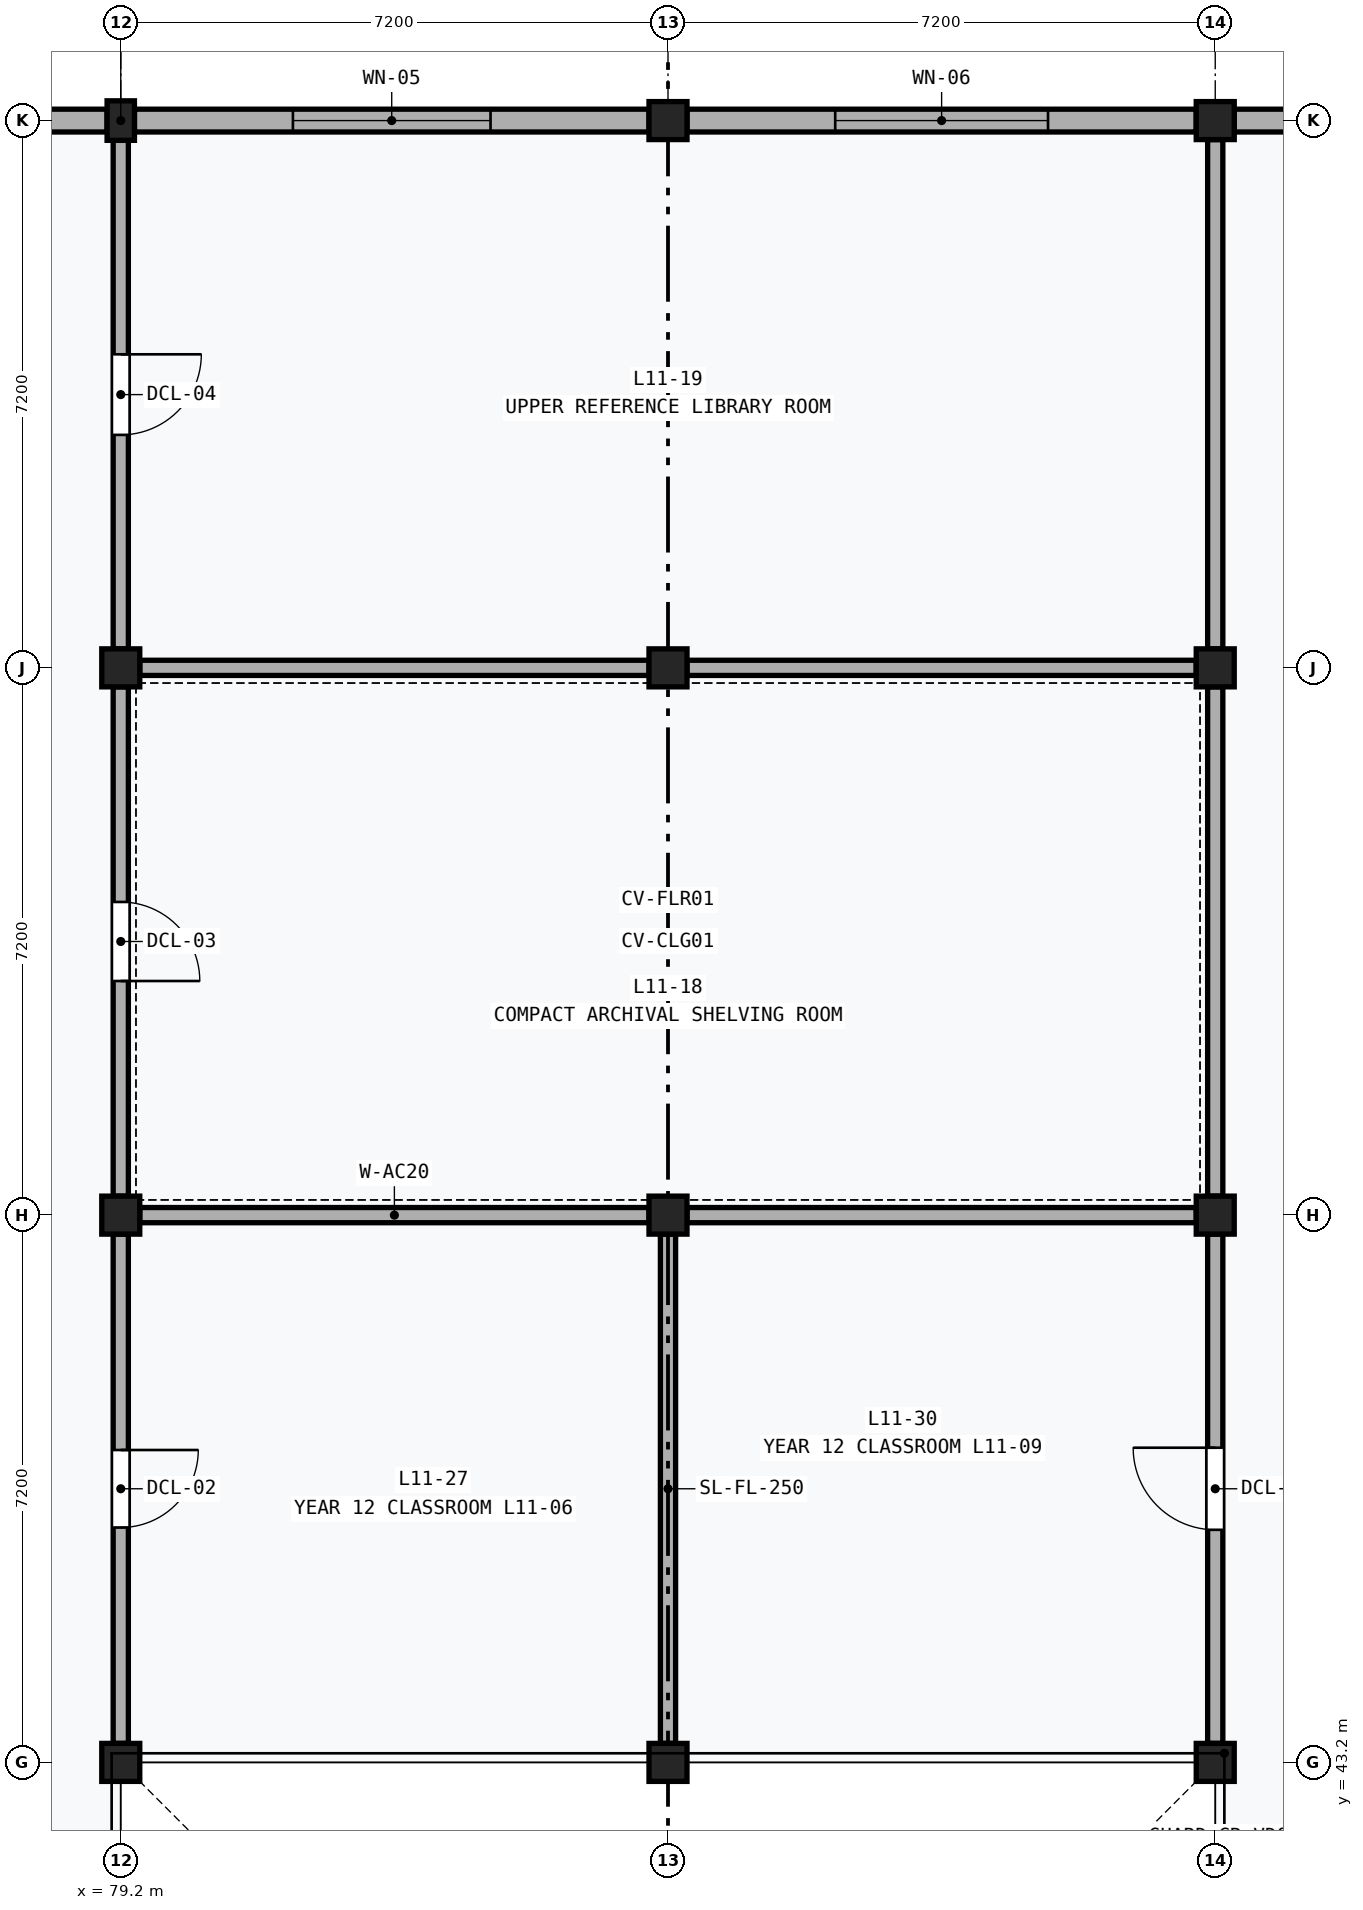
"""IFC4 building model, lengths in metres.
Left out: names, types, materials, properties, quantities, classifications, styles, units other than length and angle.
Written with IfcOpenShell. Run it as: python <this file> out.ifc"""

import sys

from ifc_helpers import new_model, si_unit, direction, frame, frame_2d, origin, origin_2d, place, context, subcontext, project, spatial, rectangle, extrude, element, fill, save


model = new_model("IFC4")
c1 = context("Model", 3, precision=1e-05, world=origin(), true_north=direction((0.0, 1.0)))
c2 = subcontext(c1, "Body", "Model", "MODEL_VIEW")
j1 = project(units=[si_unit("LENGTHUNIT", "METRE"), si_unit("PLANEANGLEUNIT", "RADIAN")], contexts=[c1])
p1 = place(None, origin())
s1 = spatial("IfcSite", under=j1, at=p1, CompositionType="ELEMENT")
p2 = place(p1, origin())
s2 = spatial("IfcBuilding", under=s1, at=p2, CompositionType="ELEMENT")
p3 = place(p2, frame((0.0, 0.0, 46.8)))
s3 = spatial("IfcBuildingStorey", under=s2, at=p3, CompositionType="ELEMENT", Elevation=46.8)
for number, where, z_axis, x_axis in (
    (1, (79.2, 43.2, 0.0), (0.0, 0.0, 1.0), (1.0, 0.0, 0.0)),
    (2, (79.2, 50.4, 0.0), (0.0, 0.0, 1.0), (1.0, 0.0, 0.0)),
    (3, (79.2, 57.6, 0.0), (0.0, 0.0, 1.0), (1.0, 0.0, 0.0)),
):
    element("IfcColumn", number, at=place(p3, frame(where, z_axis=z_axis, x_axis=x_axis)), inside=s3, PredefinedType="COLUMN", context=c2, shape_type="SweptSolid", body=[
        extrude(rectangle(XDim=0.5, YDim=0.5, at=origin_2d()), origin(), (0.0, 0.0, 1.0), 4.2),
    ])
p4 = place(p3, frame((79.2, 64.8, 0.0), z_axis=(0.0, 0.0, 1.0), x_axis=(1.0, 0.0, 0.0)))
e4 = element("IfcColumn", 4, at=p4, inside=s3, PredefinedType="PILASTER", context=c2, shape_type="SweptSolid", body=[
    extrude(rectangle(XDim=0.36, YDim=0.52, at=origin_2d()), origin(), (0.0, 0.0, 1.0), 4.2),
])
for number, where, z_axis, x_axis in (
    (5, (86.4, 43.2, 0.0), (0.0, 0.0, 1.0), (1.0, 0.0, 0.0)),
    (6, (86.4, 50.4, 0.0), (0.0, 0.0, 1.0), (1.0, 0.0, 0.0)),
    (7, (86.4, 57.6, 0.0), (0.0, 0.0, 1.0), (1.0, 0.0, 0.0)),
    (8, (86.4, 64.8, 0.0), (0.0, 0.0, 1.0), (1.0, 0.0, 0.0)),
    (9, (93.6, 43.2, 0.0), (0.0, 0.0, 1.0), (1.0, 0.0, 0.0)),
    (10, (93.6, 50.4, 0.0), (0.0, 0.0, 1.0), (1.0, 0.0, 0.0)),
    (11, (93.6, 57.6, 0.0), (0.0, 0.0, 1.0), (1.0, 0.0, 0.0)),
    (12, (93.6, 64.8, 0.0), (0.0, 0.0, 1.0), (1.0, 0.0, 0.0)),
):
    element("IfcColumn", number, at=place(p3, frame(where, z_axis=z_axis, x_axis=x_axis)), inside=s3, PredefinedType="COLUMN", context=c2, shape_type="SweptSolid", body=[
        extrude(rectangle(XDim=0.5, YDim=0.5, at=origin_2d()), origin(), (0.0, 0.0, 1.0), 4.2),
    ])
p5 = place(p3, frame((72.25, 64.8, 0.0), z_axis=(0.0, 0.0, 1.0), x_axis=(1.0, 0.0, 0.0)))
e13 = element("IfcWall", 13, at=p5, inside=s3, PredefinedType="SOLIDWALL", context=c2, shape_type="SweptSolid", body=[
    extrude(rectangle(XDim=6.77, YDim=0.3, at=frame_2d((3.385, 0.0))), origin(), (0.0, 0.0, 1.0), 3.37),
])
p6 = place(p5, frame((2.185, 0.0, 0.9)))
e14 = element("IfcOpeningElement", 14, at=p6, cuts=e13, PredefinedType="OPENING", context=c2, shape_type="SweptSolid", body=[
    extrude(rectangle(XDim=2.4, YDim=1.8, at=frame_2d((1.2, 0.9))), frame((0.0, 0.162, 0.0), z_axis=(0.0, -1.0, 0.0), x_axis=(1.0, 0.0, 0.0)), (0.0, 0.0, 1.0), 0.324),
])
p7 = place(p3, frame((79.38, 64.8, 0.0), z_axis=(0.0, 0.0, 1.0), x_axis=(1.0, 0.0, 0.0)))
e15 = element("IfcWall", 15, at=p7, inside=s3, PredefinedType="SOLIDWALL", context=c2, shape_type="SweptSolid", body=[
    extrude(rectangle(XDim=6.77, YDim=0.3, at=frame_2d((3.385, 0.0))), origin(), (0.0, 0.0, 1.0), 3.37),
])
p8 = place(p7, frame((2.085, 0.0, 0.9)))
e16 = element("IfcOpeningElement", 16, at=p8, cuts=e15, PredefinedType="OPENING", context=c2, shape_type="SweptSolid", body=[
    extrude(rectangle(XDim=2.6, YDim=1.8, at=frame_2d((1.3, 0.9))), frame((0.0, 0.162, 0.0), z_axis=(0.0, -1.0, 0.0), x_axis=(1.0, 0.0, 0.0)), (0.0, 0.0, 1.0), 0.324),
])
p9 = place(p3, frame((86.65, 64.8, 0.0), z_axis=(0.0, 0.0, 1.0), x_axis=(1.0, 0.0, 0.0)))
e17 = element("IfcWall", 17, at=p9, inside=s3, PredefinedType="SOLIDWALL", context=c2, shape_type="SweptSolid", body=[
    extrude(rectangle(XDim=6.7, YDim=0.3, at=frame_2d((3.35, 0.0))), origin(), (0.0, 0.0, 1.0), 3.37),
])
p10 = place(p9, frame((1.95, 0.0, 0.9)))
e18 = element("IfcOpeningElement", 18, at=p10, cuts=e17, PredefinedType="OPENING", context=c2, shape_type="SweptSolid", body=[
    extrude(rectangle(XDim=2.8, YDim=1.8, at=frame_2d((1.4, 0.9))), frame((0.0, 0.162, 0.0), z_axis=(0.0, -1.0, 0.0), x_axis=(1.0, 0.0, 0.0)), (0.0, 0.0, 1.0), 0.324),
])
p11 = place(p3, frame((93.85, 64.8, 0.0), z_axis=(0.0, 0.0, 1.0), x_axis=(1.0, 0.0, 0.0)))
e19 = element("IfcWall", 19, at=p11, inside=s3, PredefinedType="SOLIDWALL", context=c2, shape_type="SweptSolid", body=[
    extrude(rectangle(XDim=6.7, YDim=0.3, at=frame_2d((3.35, 0.0))), origin(), (0.0, 0.0, 1.0), 3.37),
])
p12 = place(p11, frame((1.85, 0.0, 0.9)))
e20 = element("IfcOpeningElement", 20, at=p12, cuts=e19, PredefinedType="OPENING", context=c2, shape_type="SweptSolid", body=[
    extrude(rectangle(XDim=3.0, YDim=1.8, at=frame_2d((1.5, 0.9))), frame((0.0, 0.162, 0.0), z_axis=(0.0, -1.0, 0.0), x_axis=(1.0, 0.0, 0.0)), (0.0, 0.0, 1.0), 0.324),
])
for number, where, z_axis, x_axis in (
    (21, (79.45, 50.4, 0.0), (0.0, 0.0, 1.0), (1.0, 0.0, 0.0)),
    (22, (79.45, 57.6, 0.0), (0.0, 0.0, 1.0), (1.0, 0.0, 0.0)),
):
    element("IfcWall", number, at=place(p3, frame(where, z_axis=z_axis, x_axis=x_axis)), inside=s3, PredefinedType="PARTITIONING", context=c2, shape_type="SweptSolid", body=[
        extrude(rectangle(XDim=6.7, YDim=0.2, at=frame_2d((3.35, 0.0))), origin(), (0.0, 0.0, 1.0), 3.29),
    ])
p13 = place(p3, frame((79.2, 50.65, 0.0), z_axis=(0.0, 0.0, 1.0), x_axis=(0.0, 1.0, 0.0)))
e23 = element("IfcWall", 23, at=p13, inside=s3, PredefinedType="PARTITIONING", context=c2, shape_type="SweptSolid", body=[
    extrude(rectangle(XDim=6.7, YDim=0.2, at=frame_2d((3.35, 0.0))), origin(), (0.0, 0.0, 1.0), 3.29),
])
p14 = place(p13, frame((2.83, 0.0, 0.0)))
e24 = element("IfcOpeningElement", 24, at=p14, cuts=e23, PredefinedType="OPENING", context=c2, shape_type="SweptSolid", body=[
    extrude(rectangle(XDim=1.04, YDim=2.14, at=frame_2d((0.52, 1.07))), frame((0.0, 0.112, 0.0), z_axis=(0.0, -1.0, 0.0), x_axis=(1.0, 0.0, 0.0)), (0.0, 0.0, 1.0), 0.224),
])
for number, where, z_axis, x_axis in (
    (25, (86.65, 50.4, 0.0), (0.0, 0.0, 1.0), (1.0, 0.0, 0.0)),
    (26, (86.65, 57.6, 0.0), (0.0, 0.0, 1.0), (1.0, 0.0, 0.0)),
    (27, (93.6, 50.65, 0.0), (0.0, 0.0, 1.0), (0.0, 1.0, 0.0)),
):
    element("IfcWall", number, at=place(p3, frame(where, z_axis=z_axis, x_axis=x_axis)), inside=s3, PredefinedType="PARTITIONING", context=c2, shape_type="SweptSolid", body=[
        extrude(rectangle(XDim=6.7, YDim=0.2, at=frame_2d((3.35, 0.0))), origin(), (0.0, 0.0, 1.0), 3.29),
    ])
p15 = place(p3, frame((79.2, 57.85, 0.0), z_axis=(0.0, 0.0, 1.0), x_axis=(0.0, 1.0, 0.0)))
e28 = element("IfcWall", 28, at=p15, inside=s3, PredefinedType="PARTITIONING", context=c2, shape_type="SweptSolid", body=[
    extrude(rectangle(XDim=6.69, YDim=0.2, at=frame_2d((3.345, 0.0))), origin(), (0.0, 0.0, 1.0), 3.29),
])
p16 = place(p15, frame((2.815, 0.0, 0.0)))
e29 = element("IfcOpeningElement", 29, at=p16, cuts=e28, PredefinedType="OPENING", context=c2, shape_type="SweptSolid", body=[
    extrude(rectangle(XDim=1.06, YDim=2.16, at=frame_2d((0.53, 1.08))), frame((0.0, 0.112, 0.0), z_axis=(0.0, -1.0, 0.0), x_axis=(1.0, 0.0, 0.0)), (0.0, 0.0, 1.0), 0.224),
])
p17 = place(p3, frame((93.6, 57.85, 0.0), z_axis=(0.0, 0.0, 1.0), x_axis=(0.0, 1.0, 0.0)))
e30 = element("IfcWall", 30, at=p17, inside=s3, PredefinedType="PARTITIONING", context=c2, shape_type="SweptSolid", body=[
    extrude(rectangle(XDim=6.7, YDim=0.2, at=frame_2d((3.35, 0.0))), origin(), (0.0, 0.0, 1.0), 3.29),
])
p18 = place(p3, frame((79.2, 43.45, 0.0), z_axis=(0.0, 0.0, 1.0), x_axis=(0.0, 1.0, 0.0)))
e31 = element("IfcWall", 31, at=p18, inside=s3, PredefinedType="PARTITIONING", context=c2, shape_type="SweptSolid", body=[
    extrude(rectangle(XDim=6.7, YDim=0.2, at=frame_2d((3.35, 0.0))), origin(), (0.0, 0.0, 1.0), 3.29),
])
p19 = place(p18, frame((2.84, 0.0, 0.0)))
e32 = element("IfcOpeningElement", 32, at=p19, cuts=e31, PredefinedType="OPENING", context=c2, shape_type="SweptSolid", body=[
    extrude(rectangle(XDim=1.02, YDim=2.12, at=frame_2d((0.51, 1.06))), frame((0.0, 0.112, 0.0), z_axis=(0.0, -1.0, 0.0), x_axis=(1.0, 0.0, 0.0)), (0.0, 0.0, 1.0), 0.224),
])
p20 = place(p3, frame((86.4, 43.45, 0.0), z_axis=(0.0, 0.0, 1.0), x_axis=(0.0, 1.0, 0.0)))
e33 = element("IfcWall", 33, at=p20, inside=s3, PredefinedType="PARTITIONING", context=c2, shape_type="SweptSolid", body=[
    extrude(rectangle(XDim=6.7, YDim=0.2, at=frame_2d((3.35, 0.0))), origin(), (0.0, 0.0, 1.0), 3.29),
])
p21 = place(p3, frame((93.6, 43.45, 0.0), z_axis=(0.0, 0.0, 1.0), x_axis=(0.0, 1.0, 0.0)))
e34 = element("IfcWall", 34, at=p21, inside=s3, PredefinedType="PARTITIONING", context=c2, shape_type="SweptSolid", body=[
    extrude(rectangle(XDim=6.7, YDim=0.2, at=frame_2d((3.35, 0.0))), origin(), (0.0, 0.0, 1.0), 3.29),
])
p22 = place(p21, frame((2.81, 0.0, 0.0)))
e35 = element("IfcOpeningElement", 35, at=p22, cuts=e34, PredefinedType="OPENING", context=c2, shape_type="SweptSolid", body=[
    extrude(rectangle(XDim=1.08, YDim=2.18, at=frame_2d((0.54, 1.09))), frame((0.0, 0.112, 0.0), z_axis=(0.0, -1.0, 0.0), x_axis=(1.0, 0.0, 0.0)), (0.0, 0.0, 1.0), 0.224),
])
p23 = place(p8, origin())
e36 = element("IfcWindow", 36, at=p23, inside=s3, PartitioningType="SINGLE_PANEL", PredefinedType="WINDOW", context=c2, shape_type="SweptSolid", body=[
    extrude(rectangle(XDim=2.6, YDim=1.8, at=frame_2d((1.3, 0.9))), frame((0.0, 0.03, 0.0), z_axis=(0.0, -1.0, 0.0), x_axis=(1.0, 0.0, 0.0)), (0.0, 0.0, 1.0), 0.06),
])
fill(e16, e36)
p24 = place(p10, origin())
e37 = element("IfcWindow", 37, at=p24, inside=s3, PartitioningType="SINGLE_PANEL", PredefinedType="WINDOW", context=c2, shape_type="SweptSolid", body=[
    extrude(rectangle(XDim=2.8, YDim=1.8, at=frame_2d((1.4, 0.9))), frame((0.0, 0.03, 0.0), z_axis=(0.0, -1.0, 0.0), x_axis=(1.0, 0.0, 0.0)), (0.0, 0.0, 1.0), 0.06),
])
fill(e18, e37)
p25 = place(p14, frame((1.04, 0.0, 0.0), z_axis=(0.0, 0.0, 1.0), x_axis=(-1.0, 0.0, 0.0)))
e38 = element("IfcDoor", 38, at=p25, inside=s3, OperationType="SINGLE_SWING_RIGHT", PredefinedType="DOOR", context=c2, shape_type="SweptSolid", body=[
    extrude(rectangle(XDim=1.04, YDim=2.14, at=frame_2d((0.52, 1.07))), frame((0.0, 0.025, 0.0), z_axis=(0.0, -1.0, 0.0), x_axis=(1.0, 0.0, 0.0)), (0.0, 0.0, 1.0), 0.05),
])
fill(e24, e38)
p26 = place(p16, frame((1.06, 0.0, 0.0), z_axis=(0.0, 0.0, 1.0), x_axis=(-1.0, 0.0, 0.0)))
e39 = element("IfcDoor", 39, at=p26, inside=s3, OperationType="SINGLE_SWING_LEFT", PredefinedType="DOOR", context=c2, shape_type="SweptSolid", body=[
    extrude(rectangle(XDim=1.06, YDim=2.16, at=frame_2d((0.53, 1.08))), frame((0.0, 0.025, 0.0), z_axis=(0.0, -1.0, 0.0), x_axis=(1.0, 0.0, 0.0)), (0.0, 0.0, 1.0), 0.05),
])
fill(e29, e39)
p27 = place(p19, frame((1.02, 0.0, 0.0), z_axis=(0.0, 0.0, 1.0), x_axis=(-1.0, 0.0, 0.0)))
e40 = element("IfcDoor", 40, at=p27, inside=s3, OperationType="SINGLE_SWING_LEFT", PredefinedType="DOOR", context=c2, shape_type="SweptSolid", body=[
    extrude(rectangle(XDim=1.02, YDim=2.12, at=frame_2d((0.51, 1.06))), frame((0.0, 0.025, 0.0), z_axis=(0.0, -1.0, 0.0), x_axis=(1.0, 0.0, 0.0)), (0.0, 0.0, 1.0), 0.05),
])
fill(e32, e40)
p28 = place(p22, origin())
e41 = element("IfcDoor", 41, at=p28, inside=s3, OperationType="SINGLE_SWING_RIGHT", PredefinedType="DOOR", context=c2, shape_type="SweptSolid", body=[
    extrude(rectangle(XDim=1.08, YDim=2.18, at=frame_2d((0.54, 1.09))), frame((0.0, 0.025, 0.0), z_axis=(0.0, -1.0, 0.0), x_axis=(1.0, 0.0, 0.0)), (0.0, 0.0, 1.0), 0.05),
])
fill(e35, e41)
save(model, sys.argv[1])
